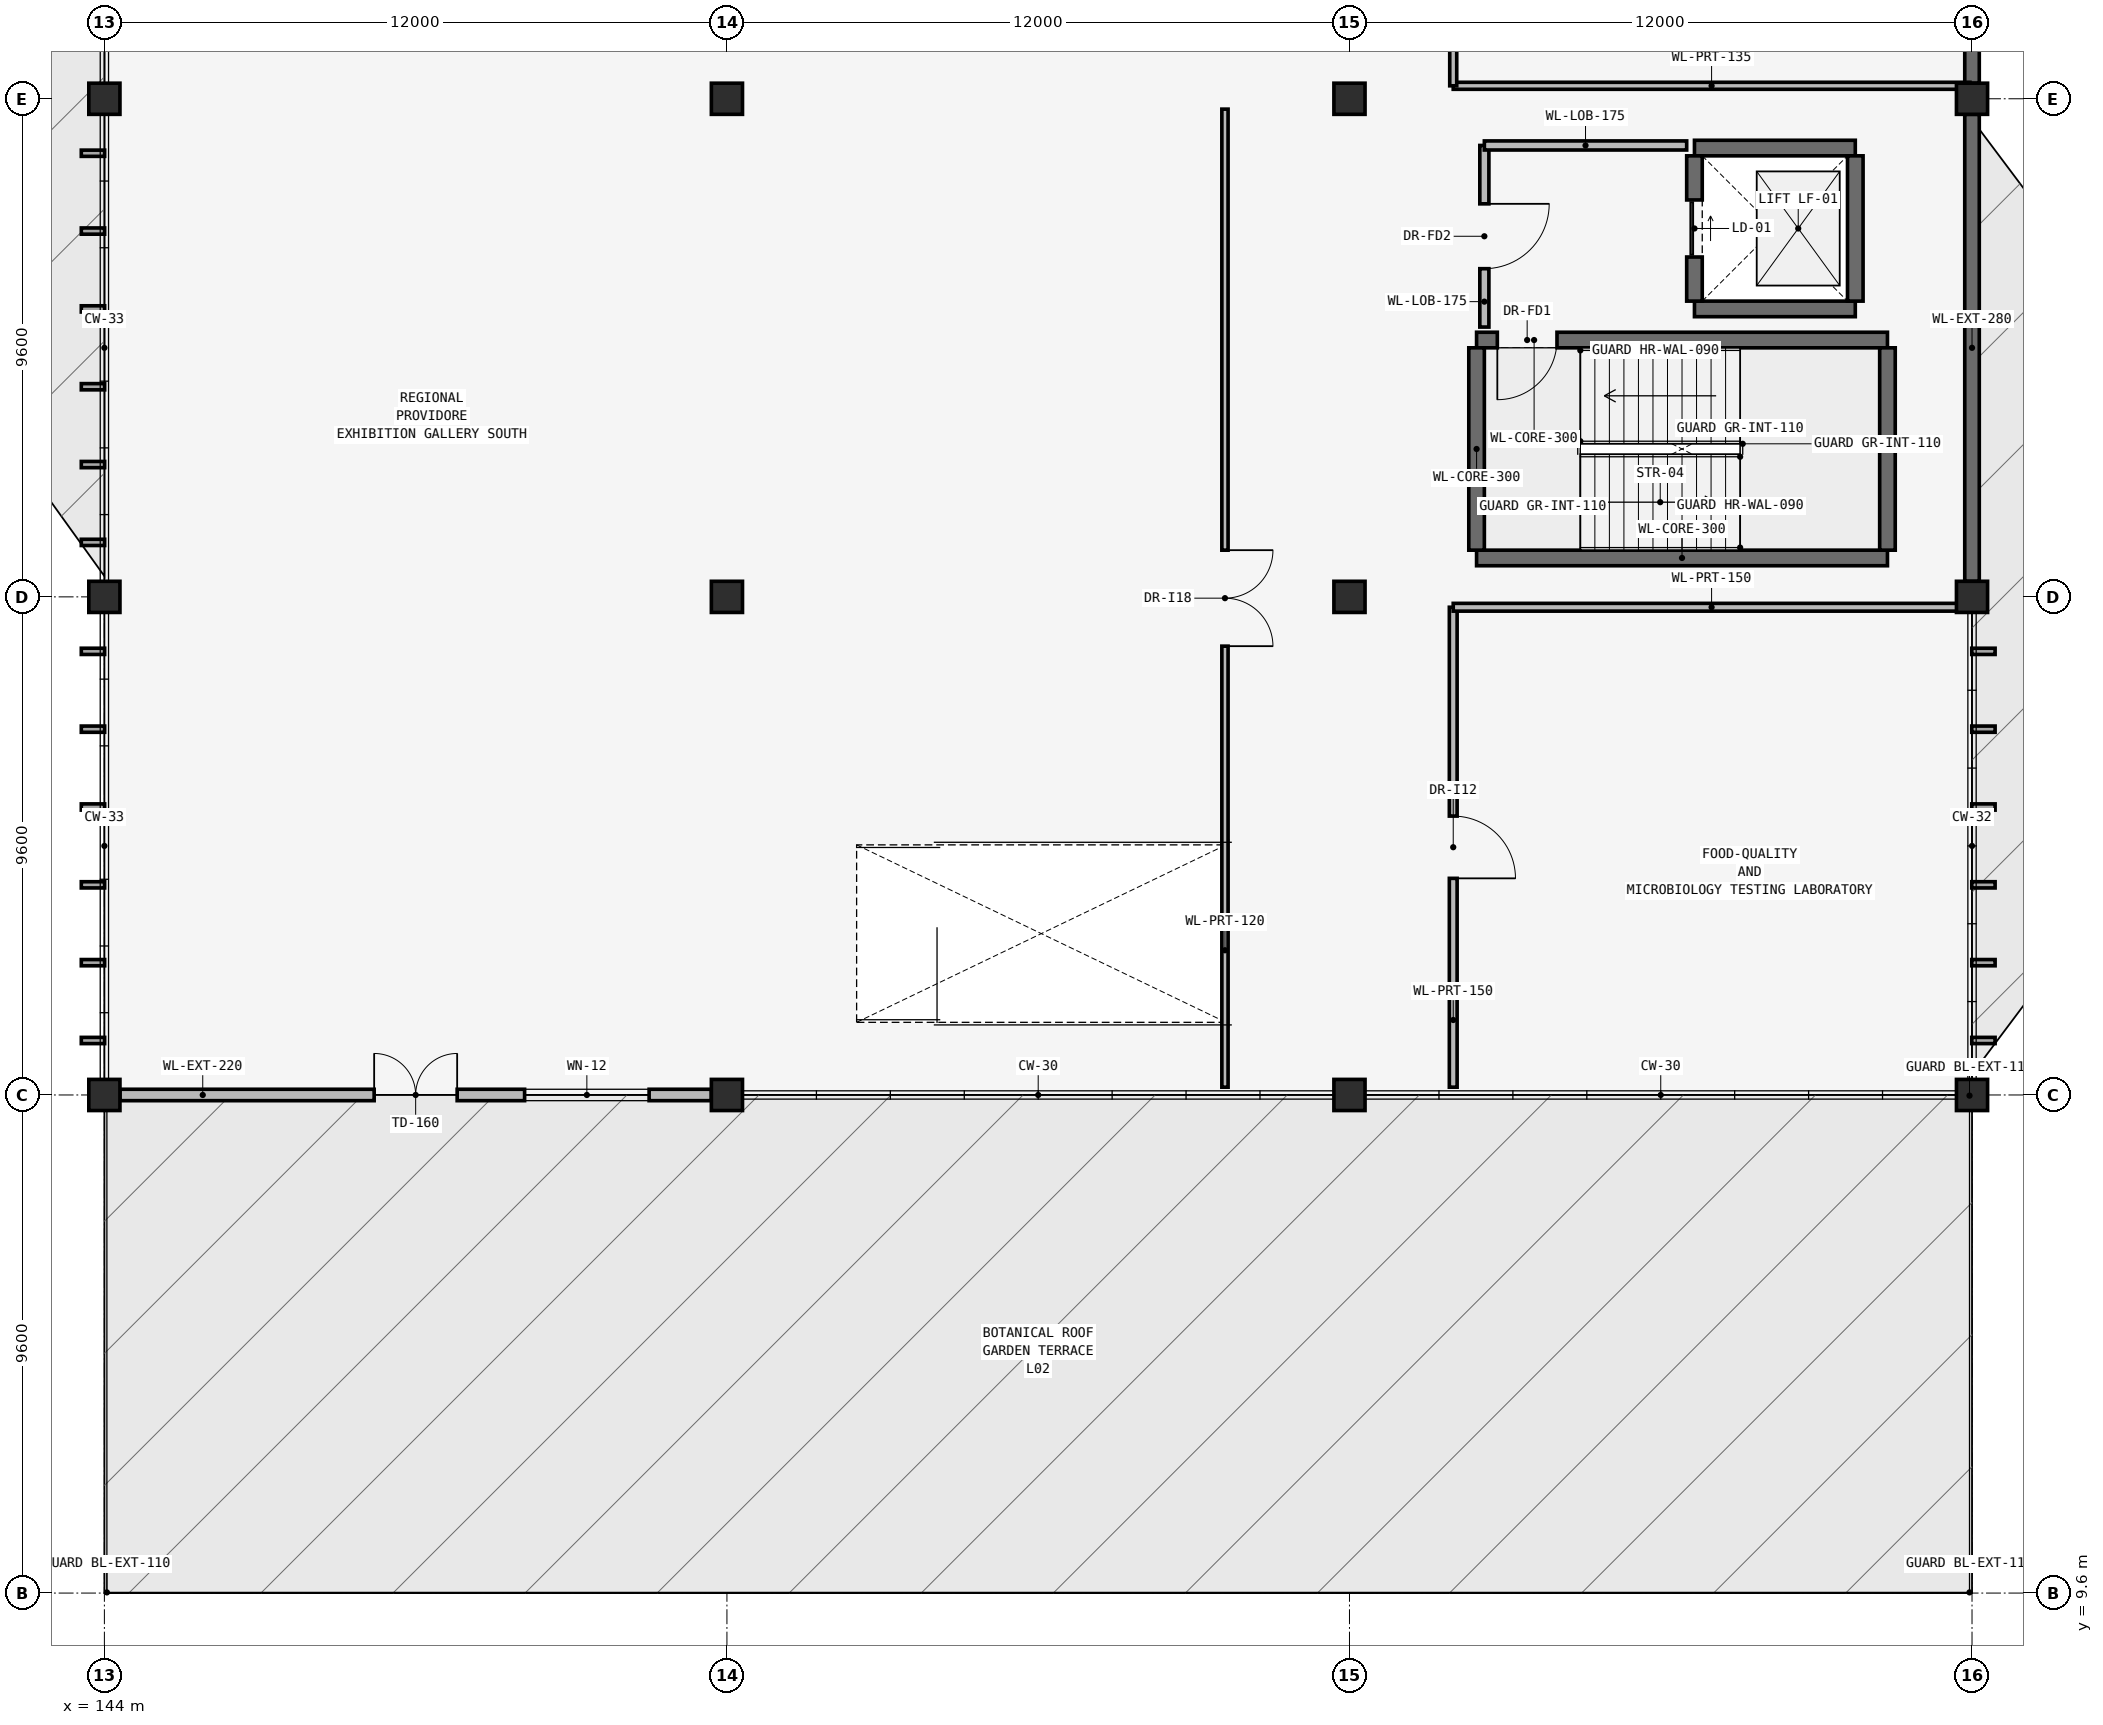
"""IFC4 building model, lengths in metres.
Left out: names, types, materials, properties, quantities, classifications, styles, units other than length and angle.
Written with IfcOpenShell. Run it as: python <this file> out.ifc"""

import sys

from ifc_helpers import new_model, si_unit, direction, frame, frame_2d, origin, origin_2d, place, context, subcontext, project, spatial, rectangle, extrude, element, fill, save


model = new_model("IFC4")
c1 = context("Model", 3, precision=1e-05, world=origin(), true_north=direction((0.0, 1.0)))
c2 = subcontext(c1, "Body", "Model", "MODEL_VIEW")
j1 = project(units=[si_unit("LENGTHUNIT", "METRE"), si_unit("PLANEANGLEUNIT", "RADIAN")], contexts=[c1])
p1 = place(None, origin())
s1 = spatial("IfcSite", under=j1, at=p1, CompositionType="ELEMENT")
p2 = place(p1, origin())
s2 = spatial("IfcBuilding", under=s1, at=p2, CompositionType="ELEMENT")
p3 = place(p2, frame((0.0, 0.0, 10.2)))
s3 = spatial("IfcBuildingStorey", under=s2, at=p3, CompositionType="ELEMENT", Elevation=10.2)
for number, where, z_axis, x_axis in (
    (1, (144.0, 19.2, 0.0), (0.0, 0.0, 1.0), (1.0, 0.0, 0.0)),
    (2, (144.0, 28.8, 0.0), (0.0, 0.0, 1.0), (1.0, 0.0, 0.0)),
    (3, (144.0, 38.4, 0.0), (0.0, 0.0, 1.0), (1.0, 0.0, 0.0)),
    (4, (156.0, 19.2, 0.0), (0.0, 0.0, 1.0), (1.0, 0.0, 0.0)),
    (5, (156.0, 28.8, 0.0), (0.0, 0.0, 1.0), (1.0, 0.0, 0.0)),
    (6, (156.0, 38.4, 0.0), (0.0, 0.0, 1.0), (1.0, 0.0, 0.0)),
    (7, (168.0, 19.2, 0.0), (0.0, 0.0, 1.0), (1.0, 0.0, 0.0)),
    (8, (168.0, 28.8, 0.0), (0.0, 0.0, 1.0), (1.0, 0.0, 0.0)),
    (9, (168.0, 38.4, 0.0), (0.0, 0.0, 1.0), (1.0, 0.0, 0.0)),
    (10, (180.0, 19.2, 0.0), (0.0, 0.0, 1.0), (1.0, 0.0, 0.0)),
    (11, (180.0, 28.8, 0.0), (0.0, 0.0, 1.0), (1.0, 0.0, 0.0)),
    (12, (180.0, 38.4, 0.0), (0.0, 0.0, 1.0), (1.0, 0.0, 0.0)),
):
    element("IfcColumn", number, at=place(p3, frame(where, z_axis=z_axis, x_axis=x_axis)), inside=s3, PredefinedType="COLUMN", context=c2, shape_type="SweptSolid", body=[
        extrude(rectangle(XDim=0.6, YDim=0.6, at=origin_2d()), origin(), (0.0, 0.0, 1.0), 4.2),
    ])
p4 = place(p3, frame((144.3, 19.2, 0.0), z_axis=(0.0, 0.0, 1.0), x_axis=(1.0, 0.0, 0.0)))
e13 = element("IfcWall", 13, at=p4, inside=s3, PredefinedType="SOLIDWALL", context=c2, shape_type="SweptSolid", body=[
    extrude(rectangle(XDim=11.4, YDim=0.22, at=frame_2d((5.7, 0.0))), origin(), (0.0, 0.0, 1.0), 3.296),
])
p5 = place(p4, frame((4.9, 0.0, 0.0)))
e14 = element("IfcOpeningElement", 14, at=p5, cuts=e13, PredefinedType="OPENING", context=c2, shape_type="SweptSolid", body=[
    extrude(rectangle(XDim=1.6, YDim=2.2, at=frame_2d((0.8, 1.1))), frame((0.0, 0.125, 0.0), z_axis=(0.0, -1.0, 0.0), x_axis=(1.0, 0.0, 0.0)), (0.0, 0.0, 1.0), 0.25),
])
p6 = place(p4, frame((7.8, 0.0, 0.8)))
e15 = element("IfcOpeningElement", 15, at=p6, cuts=e13, PredefinedType="OPENING", context=c2, shape_type="SweptSolid", body=[
    extrude(rectangle(XDim=2.4, YDim=2.1, at=frame_2d((1.2, 1.05))), frame((0.0, 0.125, 0.0), z_axis=(0.0, -1.0, 0.0), x_axis=(1.0, 0.0, 0.0)), (0.0, 0.0, 1.0), 0.25),
])
for number, where, z_axis, x_axis in (
    (16, (180.0, 29.1, 0.0), (0.0, 0.0, 1.0), (0.0, 1.0, 0.0)),
    (17, (180.0, 38.7, 0.0), (0.0, 0.0, 1.0), (0.0, 1.0, 0.0)),
):
    element("IfcWall", number, at=place(p3, frame(where, z_axis=z_axis, x_axis=x_axis)), inside=s3, PredefinedType="SOLIDWALL", context=c2, shape_type="SweptSolid", body=[
        extrude(rectangle(XDim=9.0, YDim=0.28, at=frame_2d((4.5, 0.0))), origin(), (0.0, 0.0, 1.0), 3.9),
    ])
p7 = place(p3, frame((170.45, 29.55, 0.0), z_axis=(0.0, 0.0, 1.0), x_axis=(1.0, 0.0, 0.0)))
e18 = element("IfcWall", 18, at=p7, inside=s3, PredefinedType="SHEAR", context=c2, shape_type="SweptSolid", body=[
    extrude(rectangle(XDim=7.92, YDim=0.3, at=frame_2d((3.96, 0.0))), origin(), (0.0, 0.0, 1.0), 3.94),
])
p8 = place(p3, frame((170.45, 33.75, 0.0), z_axis=(0.0, 0.0, 1.0), x_axis=(1.0, 0.0, 0.0)))
e19 = element("IfcWall", 19, at=p8, inside=s3, PredefinedType="SHEAR", context=c2, shape_type="SweptSolid", body=[
    extrude(rectangle(XDim=7.92, YDim=0.3, at=frame_2d((3.96, 0.0))), origin(), (0.0, 0.0, 1.0), 3.94),
])
p9 = place(p8, frame((0.4, 0.0, 0.0)))
e20 = element("IfcOpeningElement", 20, at=p9, cuts=e19, PredefinedType="OPENING", context=c2, shape_type="SweptSolid", body=[
    extrude(rectangle(XDim=1.15, YDim=2.15, at=frame_2d((0.575, 1.075))), frame((0.0, 0.165, 0.0), z_axis=(0.0, -1.0, 0.0), x_axis=(1.0, 0.0, 0.0)), (0.0, 0.0, 1.0), 0.33),
])
for number, where, z_axis, x_axis in (
    (21, (170.45, 29.7, 0.0), (0.0, 0.0, 1.0), (0.0, 1.0, 0.0)),
    (22, (178.37, 29.7, 0.0), (0.0, 0.0, 1.0), (0.0, 1.0, 0.0)),
):
    element("IfcWall", number, at=place(p3, frame(where, z_axis=z_axis, x_axis=x_axis)), inside=s3, PredefinedType="SHEAR", context=c2, shape_type="SweptSolid", body=[
        extrude(rectangle(XDim=3.9, YDim=0.3, at=frame_2d((1.95, 0.0))), origin(), (0.0, 0.0, 1.0), 3.94),
    ])
for number, where, z_axis, x_axis in (
    (23, (174.65, 34.35, 0.0), (0.0, 0.0, 1.0), (1.0, 0.0, 0.0)),
    (24, (174.65, 37.45, 0.0), (0.0, 0.0, 1.0), (1.0, 0.0, 0.0)),
):
    element("IfcWall", number, at=place(p3, frame(where, z_axis=z_axis, x_axis=x_axis)), inside=s3, PredefinedType="SHEAR", context=c2, shape_type="SweptSolid", body=[
        extrude(rectangle(XDim=3.1, YDim=0.3, at=frame_2d((1.55, 0.0))), origin(), (0.0, 0.0, 1.0), 3.94),
    ])
p10 = place(p3, frame((177.75, 34.5, 0.0), z_axis=(0.0, 0.0, 1.0), x_axis=(0.0, 1.0, 0.0)))
e25 = element("IfcWall", 25, at=p10, inside=s3, PredefinedType="SHEAR", context=c2, shape_type="SweptSolid", body=[
    extrude(rectangle(XDim=2.8, YDim=0.3, at=frame_2d((1.4, 0.0))), origin(), (0.0, 0.0, 1.0), 3.94),
])
p11 = place(p3, frame((174.65, 34.5, 0.0), z_axis=(0.0, 0.0, 1.0), x_axis=(0.0, 1.0, 0.0)))
e26 = element("IfcWall", 26, at=p11, inside=s3, PredefinedType="SHEAR", context=c2, shape_type="SweptSolid", body=[
    extrude(rectangle(XDim=2.8, YDim=0.3, at=frame_2d((1.4, 0.0))), origin(), (0.0, 0.0, 1.0), 3.94),
])
p12 = place(p11, frame((0.85, 0.0, 0.0)))
e27 = element("IfcOpeningElement", 27, at=p12, cuts=e26, PredefinedType="OPENING", context=c2, shape_type="SweptSolid", body=[
    extrude(rectangle(XDim=1.1, YDim=2.15, at=frame_2d((0.55, 1.075))), frame((0.0, 0.165, 0.0), z_axis=(0.0, -1.0, 0.0), x_axis=(1.0, 0.0, 0.0)), (0.0, 0.0, 1.0), 0.33),
])
p13 = place(p3, frame((170.6, 34.0, 0.0), z_axis=(0.0, 0.0, 1.0), x_axis=(0.0, 1.0, 0.0)))
e28 = element("IfcWall", 28, at=p13, inside=s3, PredefinedType="PARTITIONING", context=c2, shape_type="SweptSolid", body=[
    extrude(rectangle(XDim=3.5, YDim=0.175, at=frame_2d((1.75, 0.0))), origin(), (0.0, 0.0, 1.0), 3.94),
])
p14 = place(p13, frame((1.125, 0.0, 0.0)))
e29 = element("IfcOpeningElement", 29, at=p14, cuts=e28, PredefinedType="OPENING", context=c2, shape_type="SweptSolid", body=[
    extrude(rectangle(XDim=1.25, YDim=2.2, at=frame_2d((0.625, 1.1))), frame((0.0, 0.103, 0.0), z_axis=(0.0, -1.0, 0.0), x_axis=(1.0, 0.0, 0.0)), (0.0, 0.0, 1.0), 0.205),
])
p15 = place(p3, frame((170.6, 37.5, 0.0), z_axis=(0.0, 0.0, 1.0), x_axis=(1.0, 0.0, 0.0)))
e30 = element("IfcWall", 30, at=p15, inside=s3, PredefinedType="PARTITIONING", context=c2, shape_type="SweptSolid", body=[
    extrude(rectangle(XDim=3.9, YDim=0.175, at=frame_2d((1.95, 0.0))), origin(), (0.0, 0.0, 1.0), 3.94),
])
p16 = place(p3, frame((165.6, 19.35, 0.0), z_axis=(0.0, 0.0, 1.0), x_axis=(0.0, 1.0, 0.0)))
e31 = element("IfcWall", 31, at=p16, inside=s3, PredefinedType="PARTITIONING", context=c2, shape_type="SweptSolid", body=[
    extrude(rectangle(XDim=18.85, YDim=0.12, at=frame_2d((9.425, 0.0))), origin(), (0.0, 0.0, 1.0), 3.94),
])
p17 = place(p16, frame((8.5, 0.0, 0.0)))
e32 = element("IfcOpeningElement", 32, at=p17, cuts=e31, PredefinedType="OPENING", context=c2, shape_type="SweptSolid", body=[
    extrude(rectangle(XDim=1.85, YDim=2.2, at=frame_2d((0.925, 1.1))), frame((0.0, 0.075, 0.0), z_axis=(0.0, -1.0, 0.0), x_axis=(1.0, 0.0, 0.0)), (0.0, 0.0, 1.0), 0.15),
])
p18 = place(p3, frame((170.0, 19.35, 0.0), z_axis=(0.0, 0.0, 1.0), x_axis=(0.0, 1.0, 0.0)))
e33 = element("IfcWall", 33, at=p18, inside=s3, PredefinedType="PARTITIONING", context=c2, shape_type="SweptSolid", body=[
    extrude(rectangle(XDim=9.25, YDim=0.15, at=frame_2d((4.625, 0.0))), origin(), (0.0, 0.0, 1.0), 3.94),
])
p19 = place(p18, frame((4.025, 0.0, 0.0)))
e34 = element("IfcOpeningElement", 34, at=p19, cuts=e33, PredefinedType="OPENING", context=c2, shape_type="SweptSolid", body=[
    extrude(rectangle(XDim=1.2, YDim=2.12, at=frame_2d((0.6, 1.06))), frame((0.0, 0.09, 0.0), z_axis=(0.0, -1.0, 0.0), x_axis=(1.0, 0.0, 0.0)), (0.0, 0.0, 1.0), 0.18),
])
p20 = place(p3, frame((170.0, 28.6, 0.0), z_axis=(0.0, 0.0, 1.0), x_axis=(1.0, 0.0, 0.0)))
e35 = element("IfcWall", 35, at=p20, inside=s3, PredefinedType="PARTITIONING", context=c2, shape_type="SweptSolid", body=[
    extrude(rectangle(XDim=9.96, YDim=0.15, at=frame_2d((4.98, 0.0))), origin(), (0.0, 0.0, 1.0), 3.488),
])
p21 = place(p3, frame((170.0, 38.65, 0.0), z_axis=(0.0, 0.0, 1.0), x_axis=(1.0, 0.0, 0.0)))
e36 = element("IfcWall", 36, at=p21, inside=s3, PredefinedType="PARTITIONING", context=c2, shape_type="SweptSolid", body=[
    extrude(rectangle(XDim=9.96, YDim=0.135, at=frame_2d((4.98, 0.0))), origin(), (0.0, 0.0, 1.0), 3.94),
])
p22 = place(p3, frame((170.0, 38.65, 0.0), z_axis=(0.0, 0.0, 1.0), x_axis=(0.0, 1.0, 0.0)))
e37 = element("IfcWall", 37, at=p22, inside=s3, PredefinedType="PARTITIONING", context=c2, shape_type="SweptSolid", body=[
    extrude(rectangle(XDim=5.25, YDim=0.135, at=frame_2d((2.625, 0.0))), origin(), (0.0, 0.0, 1.0), 3.94),
])
p23 = place(p22, frame((2.15, 0.0, 0.0)))
e38 = element("IfcOpeningElement", 38, at=p23, cuts=e37, PredefinedType="OPENING", context=c2, shape_type="SweptSolid", body=[
    extrude(rectangle(XDim=0.95, YDim=2.1, at=frame_2d((0.475, 1.05))), frame((0.0, 0.083, 0.0), z_axis=(0.0, -1.0, 0.0), x_axis=(1.0, 0.0, 0.0)), (0.0, 0.0, 1.0), 0.165),
])
p24 = place(p5, frame((1.6, 0.0, 0.0), z_axis=(0.0, 0.0, 1.0), x_axis=(-1.0, 0.0, 0.0)))
e39 = element("IfcDoor", 39, at=p24, inside=s3, OperationType="DOUBLE_DOOR_SINGLE_SWING", PredefinedType="DOOR", context=c2, shape_type="SweptSolid", body=[
    extrude(rectangle(XDim=1.6, YDim=2.2, at=frame_2d((0.8, 1.1))), frame((0.0, 0.025, 0.0), z_axis=(0.0, -1.0, 0.0), x_axis=(1.0, 0.0, 0.0)), (0.0, 0.0, 1.0), 0.05),
])
fill(e14, e39)
p25 = place(p6, origin())
e40 = element("IfcWindow", 40, at=p25, inside=s3, PartitioningType="SINGLE_PANEL", PredefinedType="WINDOW", context=c2, shape_type="SweptSolid", body=[
    extrude(rectangle(XDim=2.4, YDim=2.1, at=frame_2d((1.2, 1.05))), frame((0.0, 0.03, 0.0), z_axis=(0.0, -1.0, 0.0), x_axis=(1.0, 0.0, 0.0)), (0.0, 0.0, 1.0), 0.06),
])
fill(e15, e40)
p26 = place(p9, frame((1.15, 0.0, 0.0), z_axis=(0.0, 0.0, 1.0), x_axis=(-1.0, 0.0, 0.0)))
e41 = element("IfcDoor", 41, at=p26, inside=s3, OperationType="SINGLE_SWING_LEFT", PredefinedType="DOOR", context=c2, shape_type="SweptSolid", body=[
    extrude(rectangle(XDim=1.15, YDim=2.15, at=frame_2d((0.575, 1.075))), frame((0.0, 0.025, 0.0), z_axis=(0.0, -1.0, 0.0), x_axis=(1.0, 0.0, 0.0)), (0.0, 0.0, 1.0), 0.05),
])
fill(e20, e41)
p27 = place(p12, origin())
e42 = element("IfcDoor", 42, at=p27, inside=s3, OperationType="SLIDING_TO_LEFT", PredefinedType="DOOR", context=c2, shape_type="SweptSolid", body=[
    extrude(rectangle(XDim=1.1, YDim=2.15, at=frame_2d((0.55, 1.075))), frame((0.0, 0.025, 0.0), z_axis=(0.0, -1.0, 0.0), x_axis=(1.0, 0.0, 0.0)), (0.0, 0.0, 1.0), 0.05),
])
fill(e27, e42)
p28 = place(p14, frame((1.25, 0.0, 0.0), z_axis=(0.0, 0.0, 1.0), x_axis=(-1.0, 0.0, 0.0)))
e43 = element("IfcDoor", 43, at=p28, inside=s3, OperationType="SINGLE_SWING_RIGHT", PredefinedType="DOOR", context=c2, shape_type="SweptSolid", body=[
    extrude(rectangle(XDim=1.25, YDim=2.2, at=frame_2d((0.625, 1.1))), frame((0.0, 0.025, 0.0), z_axis=(0.0, -1.0, 0.0), x_axis=(1.0, 0.0, 0.0)), (0.0, 0.0, 1.0), 0.05),
])
fill(e29, e43)
p29 = place(p17, origin())
e44 = element("IfcDoor", 44, at=p29, inside=s3, OperationType="DOUBLE_DOOR_SINGLE_SWING", PredefinedType="DOOR", context=c2, shape_type="SweptSolid", body=[
    extrude(rectangle(XDim=1.85, YDim=2.2, at=frame_2d((0.925, 1.1))), frame((0.0, 0.025, 0.0), z_axis=(0.0, -1.0, 0.0), x_axis=(1.0, 0.0, 0.0)), (0.0, 0.0, 1.0), 0.05),
])
fill(e32, e44)
p30 = place(p19, origin())
e45 = element("IfcDoor", 45, at=p30, inside=s3, OperationType="SINGLE_SWING_LEFT", PredefinedType="DOOR", context=c2, shape_type="SweptSolid", body=[
    extrude(rectangle(XDim=1.2, YDim=2.12, at=frame_2d((0.6, 1.06))), frame((0.0, 0.025, 0.0), z_axis=(0.0, -1.0, 0.0), x_axis=(1.0, 0.0, 0.0)), (0.0, 0.0, 1.0), 0.05),
])
fill(e34, e45)
save(model, sys.argv[1])
